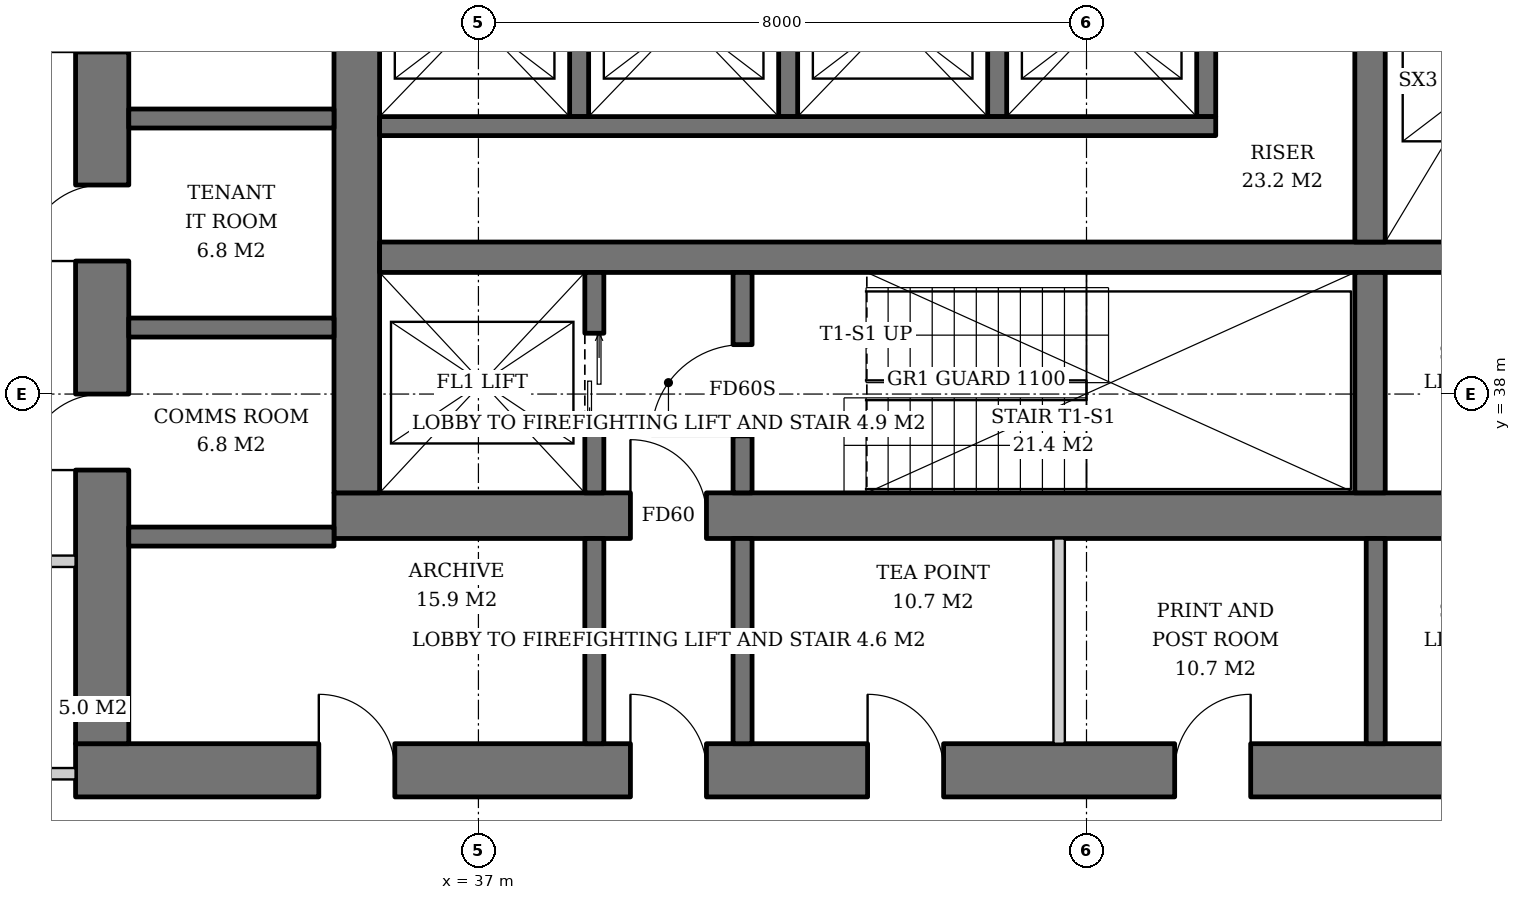
"""IFC4 building model, lengths in metres.
Left out: names, types, materials, properties, quantities, classifications, styles, units other than length and angle.
Written with IfcOpenShell. Run it as: python <this file> out.ifc"""

import sys

from ifc_helpers import new_model, si_unit, direction, frame, frame_2d, origin, place, context, subcontext, project, spatial, rectangle, extrude, element, fill, save


model = new_model("IFC4")
c1 = context("Model", 3, precision=1e-05, world=origin(), true_north=direction((0.0, 1.0)))
c2 = subcontext(c1, "Body", "Model", "MODEL_VIEW")
j1 = project(units=[si_unit("LENGTHUNIT", "METRE"), si_unit("PLANEANGLEUNIT", "RADIAN")], contexts=[c1])
p1 = place(None, origin())
s1 = spatial("IfcSite", under=j1, at=p1, CompositionType="ELEMENT")
p2 = place(p1, origin())
s2 = spatial("IfcBuilding", under=s1, at=p2, CompositionType="ELEMENT")
p3 = place(p2, frame((0.0, 0.0, 146.4)))
s3 = spatial("IfcBuildingStorey", under=s2, at=p3, CompositionType="ELEMENT", Elevation=146.4)
p4 = place(p3, frame((35.1, 36.4, 0.0), z_axis=(0.0, 0.0, 1.0), x_axis=(1.0, 0.0, 0.0)))
e1 = element("IfcWall", 1, at=p4, inside=s3, PredefinedType="SHEAR", context=c2, shape_type="SweptSolid", body=[
    extrude(rectangle(XDim=19.8, YDim=0.6, at=frame_2d((9.9, 0.0))), origin(), (0.0, 0.0, 1.0), 3.8),
])
p5 = place(p4, frame((3.9, 0.0, 0.0)))
e2 = element("IfcOpeningElement", 2, at=p5, cuts=e1, PredefinedType="OPENING", context=c2, shape_type="SweptSolid", body=[
    extrude(rectangle(XDim=1.0, YDim=2.1, at=frame_2d((0.5, 1.05))), frame((0.0, 0.31, 0.0), z_axis=(0.0, -1.0, 0.0), x_axis=(1.0, 0.0, 0.0)), (0.0, 0.0, 1.0), 0.62),
])
p6 = place(p4, frame((15.35, 0.0, 0.0)))
e3 = element("IfcOpeningElement", 3, at=p6, cuts=e1, PredefinedType="OPENING", context=c2, shape_type="SweptSolid", body=[
    extrude(rectangle(XDim=1.0, YDim=2.1, at=frame_2d((0.5, 1.05))), frame((0.0, 0.31, 0.0), z_axis=(0.0, -1.0, 0.0), x_axis=(1.0, 0.0, 0.0)), (0.0, 0.0, 1.0), 0.62),
])
p7 = place(p3, frame((35.4, 36.7, 0.0), z_axis=(0.0, 0.0, 1.0), x_axis=(0.0, 1.0, 0.0)))
e4 = element("IfcWall", 4, at=p7, inside=s3, PredefinedType="SHEAR", context=c2, shape_type="SweptSolid", body=[
    extrude(rectangle(XDim=18.6, YDim=0.6, at=frame_2d((9.3, 0.0))), origin(), (0.0, 0.0, 1.0), 3.8),
])
p8 = place(p7, frame((8.4, 0.0, 0.0)))
e5 = element("IfcOpeningElement", 5, at=p8, cuts=e4, PredefinedType="OPENING", context=c2, shape_type="SweptSolid", body=[
    extrude(rectangle(XDim=1.8, YDim=2.4, at=frame_2d((0.9, 1.2))), frame((0.0, 0.31, 0.0), z_axis=(0.0, -1.0, 0.0), x_axis=(1.0, 0.0, 0.0)), (0.0, 0.0, 1.0), 0.62),
])
p9 = place(p3, frame((31.7, 33.05, 0.0), z_axis=(0.0, 0.0, 1.0), x_axis=(1.0, 0.0, 0.0)))
e6 = element("IfcWall", 6, at=p9, inside=s3, PredefinedType="SHEAR", context=c2, shape_type="SweptSolid", body=[
    extrude(rectangle(XDim=26.6, YDim=0.7, at=frame_2d((13.3, 0.0))), origin(), (0.0, 0.0, 1.0), 3.8),
])
p10 = place(p9, frame((7.3, 0.0, 0.0)))
e7 = element("IfcOpeningElement", 7, at=p10, cuts=e6, PredefinedType="OPENING", context=c2, shape_type="SweptSolid", body=[
    extrude(rectangle(XDim=1.0, YDim=2.1, at=frame_2d((0.5, 1.05))), frame((0.0, 0.36, 0.0), z_axis=(0.0, -1.0, 0.0), x_axis=(1.0, 0.0, 0.0)), (0.0, 0.0, 1.0), 0.72),
])
p11 = place(p9, frame((18.75, 0.0, 0.0)))
e8 = element("IfcOpeningElement", 8, at=p11, cuts=e6, PredefinedType="OPENING", context=c2, shape_type="SweptSolid", body=[
    extrude(rectangle(XDim=1.0, YDim=2.1, at=frame_2d((0.5, 1.05))), frame((0.0, 0.36, 0.0), z_axis=(0.0, -1.0, 0.0), x_axis=(1.0, 0.0, 0.0)), (0.0, 0.0, 1.0), 0.72),
])
p12 = place(p9, frame((3.2, 0.0, 0.0)))
e9 = element("IfcOpeningElement", 9, at=p12, cuts=e6, PredefinedType="OPENING", context=c2, shape_type="SweptSolid", body=[
    extrude(rectangle(XDim=1.0, YDim=2.1, at=frame_2d((0.5, 1.05))), frame((0.0, 0.36, 0.0), z_axis=(0.0, -1.0, 0.0), x_axis=(1.0, 0.0, 0.0)), (0.0, 0.0, 1.0), 0.72),
])
p13 = place(p9, frame((10.42, 0.0, 0.0)))
e10 = element("IfcOpeningElement", 10, at=p13, cuts=e6, PredefinedType="OPENING", context=c2, shape_type="SweptSolid", body=[
    extrude(rectangle(XDim=1.0, YDim=2.1, at=frame_2d((0.5, 1.05))), frame((0.0, 0.36, 0.0), z_axis=(0.0, -1.0, 0.0), x_axis=(1.0, 0.0, 0.0)), (0.0, 0.0, 1.0), 0.72),
])
p14 = place(p9, frame((14.46, 0.0, 0.0)))
e11 = element("IfcOpeningElement", 11, at=p14, cuts=e6, PredefinedType="OPENING", context=c2, shape_type="SweptSolid", body=[
    extrude(rectangle(XDim=1.0, YDim=2.1, at=frame_2d((0.5, 1.05))), frame((0.0, 0.36, 0.0), z_axis=(0.0, -1.0, 0.0), x_axis=(1.0, 0.0, 0.0)), (0.0, 0.0, 1.0), 0.72),
])
p15 = place(p9, frame((22.5, 0.0, 0.0)))
e12 = element("IfcOpeningElement", 12, at=p15, cuts=e6, PredefinedType="OPENING", context=c2, shape_type="SweptSolid", body=[
    extrude(rectangle(XDim=1.0, YDim=2.1, at=frame_2d((0.5, 1.05))), frame((0.0, 0.36, 0.0), z_axis=(0.0, -1.0, 0.0), x_axis=(1.0, 0.0, 0.0)), (0.0, 0.0, 1.0), 0.72),
])
p16 = place(p3, frame((32.05, 33.4, 0.0), z_axis=(0.0, 0.0, 1.0), x_axis=(0.0, 1.0, 0.0)))
e13 = element("IfcWall", 13, at=p16, inside=s3, PredefinedType="SHEAR", context=c2, shape_type="SweptSolid", body=[
    extrude(rectangle(XDim=25.2, YDim=0.7, at=frame_2d((12.6, 0.0))), origin(), (0.0, 0.0, 1.0), 3.8),
])
p17 = place(p16, frame((11.7, 0.0, 0.0)))
e14 = element("IfcOpeningElement", 14, at=p17, cuts=e13, PredefinedType="OPENING", context=c2, shape_type="SweptSolid", body=[
    extrude(rectangle(XDim=1.8, YDim=2.4, at=frame_2d((0.9, 1.2))), frame((0.0, 0.36, 0.0), z_axis=(0.0, -1.0, 0.0), x_axis=(1.0, 0.0, 0.0)), (0.0, 0.0, 1.0), 0.72),
])
p18 = place(p16, frame((3.6, 0.0, 0.0)))
e15 = element("IfcOpeningElement", 15, at=p18, cuts=e13, PredefinedType="OPENING", context=c2, shape_type="SweptSolid", body=[
    extrude(rectangle(XDim=1.0, YDim=2.1, at=frame_2d((0.5, 1.05))), frame((0.0, 0.36, 0.0), z_axis=(0.0, -1.0, 0.0), x_axis=(1.0, 0.0, 0.0)), (0.0, 0.0, 1.0), 0.72),
])
p19 = place(p16, frame((6.35, 0.0, 0.0)))
e16 = element("IfcOpeningElement", 16, at=p19, cuts=e13, PredefinedType="OPENING", context=c2, shape_type="SweptSolid", body=[
    extrude(rectangle(XDim=1.0, YDim=2.1, at=frame_2d((0.5, 1.05))), frame((0.0, 0.36, 0.0), z_axis=(0.0, -1.0, 0.0), x_axis=(1.0, 0.0, 0.0)), (0.0, 0.0, 1.0), 0.72),
])
p20 = place(p16, frame((9.1, 0.0, 0.0)))
e17 = element("IfcOpeningElement", 17, at=p20, cuts=e13, PredefinedType="OPENING", context=c2, shape_type="SweptSolid", body=[
    extrude(rectangle(XDim=1.0, YDim=2.1, at=frame_2d((0.5, 1.05))), frame((0.0, 0.36, 0.0), z_axis=(0.0, -1.0, 0.0), x_axis=(1.0, 0.0, 0.0)), (0.0, 0.0, 1.0), 0.72),
])
p21 = place(p16, frame((15.1, 0.0, 0.0)))
e18 = element("IfcOpeningElement", 18, at=p21, cuts=e13, PredefinedType="OPENING", context=c2, shape_type="SweptSolid", body=[
    extrude(rectangle(XDim=1.0, YDim=2.1, at=frame_2d((0.5, 1.05))), frame((0.0, 0.36, 0.0), z_axis=(0.0, -1.0, 0.0), x_axis=(1.0, 0.0, 0.0)), (0.0, 0.0, 1.0), 0.72),
])
p22 = place(p16, frame((17.85, 0.0, 0.0)))
e19 = element("IfcOpeningElement", 19, at=p22, cuts=e13, PredefinedType="OPENING", context=c2, shape_type="SweptSolid", body=[
    extrude(rectangle(XDim=1.0, YDim=2.1, at=frame_2d((0.5, 1.05))), frame((0.0, 0.36, 0.0), z_axis=(0.0, -1.0, 0.0), x_axis=(1.0, 0.0, 0.0)), (0.0, 0.0, 1.0), 0.72),
])
p23 = place(p3, frame((35.7, 39.8, 0.0), z_axis=(0.0, 0.0, 1.0), x_axis=(1.0, 0.0, 0.0)))
e20 = element("IfcWall", 20, at=p23, inside=s3, PredefinedType="SHEAR", context=c2, shape_type="SweptSolid", body=[
    extrude(rectangle(XDim=18.6, YDim=0.4, at=frame_2d((9.3, 0.0))), origin(), (0.0, 0.0, 1.0), 3.8),
])
p24 = place(p3, frame((48.73, 36.7, 0.0), z_axis=(0.0, 0.0, 1.0), x_axis=(0.0, 1.0, 0.0)))
e21 = element("IfcWall", 21, at=p24, inside=s3, PredefinedType="SHEAR", context=c2, shape_type="SweptSolid", body=[
    extrude(rectangle(XDim=2.9, YDim=0.4, at=frame_2d((1.45, 0.0))), origin(), (0.0, 0.0, 1.0), 3.8),
])
p25 = place(p3, frame((48.73, 40.0, 0.0), z_axis=(0.0, 0.0, 1.0), x_axis=(0.0, 1.0, 0.0)))
e22 = element("IfcWall", 22, at=p25, inside=s3, PredefinedType="SHEAR", context=c2, shape_type="SweptSolid", body=[
    extrude(rectangle(XDim=12.0, YDim=0.4, at=frame_2d((6.0, 0.0))), origin(), (0.0, 0.0, 1.0), 3.8),
])
p26 = place(p3, frame((38.525, 36.7, 0.0), z_axis=(0.0, 0.0, 1.0), x_axis=(0.0, 1.0, 0.0)))
e23 = element("IfcWall", 23, at=p26, inside=s3, PredefinedType="SHEAR", context=c2, shape_type="SweptSolid", body=[
    extrude(rectangle(XDim=2.9, YDim=0.25, at=frame_2d((1.45, 0.0))), origin(), (0.0, 0.0, 1.0), 3.8),
])
p27 = place(p26, frame((0.8, 0.0, 0.0)))
e24 = element("IfcOpeningElement", 24, at=p27, cuts=e23, PredefinedType="OPENING", context=c2, shape_type="SweptSolid", body=[
    extrude(rectangle(XDim=1.3, YDim=2.2, at=frame_2d((0.65, 1.1))), frame((0.0, 0.135, 0.0), z_axis=(0.0, -1.0, 0.0), x_axis=(1.0, 0.0, 0.0)), (0.0, 0.0, 1.0), 0.27),
])
p28 = place(p3, frame((40.475, 36.7, 0.0), z_axis=(0.0, 0.0, 1.0), x_axis=(0.0, 1.0, 0.0)))
e25 = element("IfcWall", 25, at=p28, inside=s3, PredefinedType="SHEAR", context=c2, shape_type="SweptSolid", body=[
    extrude(rectangle(XDim=2.9, YDim=0.25, at=frame_2d((1.45, 0.0))), origin(), (0.0, 0.0, 1.0), 3.8),
])
p29 = place(p28, frame((0.75, 0.0, 0.0)))
e26 = element("IfcOpeningElement", 26, at=p29, cuts=e25, PredefinedType="OPENING", context=c2, shape_type="SweptSolid", body=[
    extrude(rectangle(XDim=1.2, YDim=2.1, at=frame_2d((0.6, 1.05))), frame((0.0, 0.135, 0.0), z_axis=(0.0, -1.0, 0.0), x_axis=(1.0, 0.0, 0.0)), (0.0, 0.0, 1.0), 0.27),
])
for number, where, z_axis, x_axis in (
    (27, (38.325, 44.25, 0.0), (0.0, 0.0, 1.0), (0.0, -1.0, 0.0)),
    (28, (41.075, 44.25, 0.0), (0.0, 0.0, 1.0), (0.0, -1.0, 0.0)),
    (29, (43.825, 44.25, 0.0), (0.0, 0.0, 1.0), (0.0, -1.0, 0.0)),
    (30, (46.575, 44.25, 0.0), (0.0, 0.0, 1.0), (0.0, -1.0, 0.0)),
):
    element("IfcWall", number, at=place(p3, frame(where, z_axis=z_axis, x_axis=x_axis)), inside=s3, PredefinedType="SHEAR", context=c2, shape_type="SweptSolid", body=[
        extrude(rectangle(XDim=2.6, YDim=0.25, at=frame_2d((1.3, 0.0))), origin(), (0.0, 0.0, 1.0), 3.8),
    ])
p30 = place(p3, frame((35.7, 41.525, 0.0), z_axis=(0.0, 0.0, 1.0), x_axis=(1.0, 0.0, 0.0)))
e31 = element("IfcWall", 31, at=p30, inside=s3, PredefinedType="SHEAR", context=c2, shape_type="SweptSolid", body=[
    extrude(rectangle(XDim=11.0, YDim=0.25, at=frame_2d((5.5, 0.0))), origin(), (0.0, 0.0, 1.0), 3.8),
])
for number, where, z_axis, x_axis in (
    (32, (32.4, 36.125, 0.0), (0.0, 0.0, 1.0), (1.0, 0.0, 0.0)),
    (33, (32.4, 38.875, 0.0), (0.0, 0.0, 1.0), (1.0, 0.0, 0.0)),
    (34, (32.4, 41.625, 0.0), (0.0, 0.0, 1.0), (1.0, 0.0, 0.0)),
):
    element("IfcWall", number, at=place(p3, frame(where, z_axis=z_axis, x_axis=x_axis)), inside=s3, PredefinedType="SHEAR", context=c2, shape_type="SweptSolid", body=[
        extrude(rectangle(XDim=2.7, YDim=0.25, at=frame_2d((1.35, 0.0))), origin(), (0.0, 0.0, 1.0), 3.8),
    ])
for number, where, z_axis, x_axis in (
    (35, (38.525, 33.4, 0.0), (0.0, 0.0, 1.0), (0.0, 1.0, 0.0)),
    (36, (40.475, 33.4, 0.0), (0.0, 0.0, 1.0), (0.0, 1.0, 0.0)),
    (37, (48.805, 33.4, 0.0), (0.0, 0.0, 1.0), (0.0, 1.0, 0.0)),
):
    element("IfcWall", number, at=place(p3, frame(where, z_axis=z_axis, x_axis=x_axis)), inside=s3, PredefinedType="SOLIDWALL", context=c2, shape_type="SweptSolid", body=[
        extrude(rectangle(XDim=2.7, YDim=0.25, at=frame_2d((1.35, 0.0))), origin(), (0.0, 0.0, 1.0), 3.62),
    ])
p31 = place(p3, frame((44.64, 33.4, 0.0), z_axis=(0.0, 0.0, 1.0), x_axis=(0.0, 1.0, 0.0)))
e38 = element("IfcWall", 38, at=p31, inside=s3, PredefinedType="SOLIDWALL", context=c2, shape_type="SweptSolid", body=[
    extrude(rectangle(XDim=2.7, YDim=0.15, at=frame_2d((1.35, 0.0))), origin(), (0.0, 0.0, 1.0), 3.62),
])
for number, where, z_axis, x_axis in (
    (39, (31.7, 35.8, 0.0), (0.0, 0.0, 1.0), (-1.0, 0.0, 0.0)),
    (40, (31.7, 33.005, 0.0), (0.0, 0.0, 1.0), (-1.0, 0.0, 0.0)),
):
    element("IfcWall", number, at=place(p3, frame(where, z_axis=z_axis, x_axis=x_axis)), inside=s3, PredefinedType="PARTITIONING", context=c2, shape_type="SweptSolid", body=[
        extrude(rectangle(XDim=1.725, YDim=0.15, at=frame_2d((0.862, 0.0))), origin(), (0.0, 0.0, 1.0), 3.62),
    ])
p32 = place(p27, origin())
e41 = element("IfcDoor", 41, at=p32, inside=s3, OperationType="DOUBLE_DOOR_SLIDING", PredefinedType="DOOR", context=c2, shape_type="SweptSolid", body=[
    extrude(rectangle(XDim=1.3, YDim=2.2, at=frame_2d((0.65, 1.1))), frame((0.0, 0.025, 0.0), z_axis=(0.0, -1.0, 0.0), x_axis=(1.0, 0.0, 0.0)), (0.0, 0.0, 1.0), 0.05),
])
fill(e24, e41)
p33 = place(p29, origin())
e42 = element("IfcDoor", 42, at=p33, inside=s3, OperationType="SINGLE_SWING_LEFT", PredefinedType="DOOR", context=c2, shape_type="SweptSolid", body=[
    extrude(rectangle(XDim=1.2, YDim=2.1, at=frame_2d((0.6, 1.05))), frame((0.0, 0.025, 0.0), z_axis=(0.0, -1.0, 0.0), x_axis=(1.0, 0.0, 0.0)), (0.0, 0.0, 1.0), 0.05),
])
fill(e26, e42)
p34 = place(p5, origin())
e43 = element("IfcDoor", 43, at=p34, inside=s3, OperationType="SINGLE_SWING_LEFT", PredefinedType="DOOR", context=c2, shape_type="SweptSolid", body=[
    extrude(rectangle(XDim=1.0, YDim=2.1, at=frame_2d((0.5, 1.05))), frame((0.0, 0.025, 0.0), z_axis=(0.0, -1.0, 0.0), x_axis=(1.0, 0.0, 0.0)), (0.0, 0.0, 1.0), 0.05),
])
fill(e2, e43)
p35 = place(p10, origin())
e44 = element("IfcDoor", 44, at=p35, inside=s3, OperationType="SINGLE_SWING_LEFT", PredefinedType="DOOR", context=c2, shape_type="SweptSolid", body=[
    extrude(rectangle(XDim=1.0, YDim=2.1, at=frame_2d((0.5, 1.05))), frame((0.0, 0.025, 0.0), z_axis=(0.0, -1.0, 0.0), x_axis=(1.0, 0.0, 0.0)), (0.0, 0.0, 1.0), 0.05),
])
fill(e7, e44)
p36 = place(p18, origin())
e45 = element("IfcDoor", 45, at=p36, inside=s3, OperationType="SINGLE_SWING_LEFT", PredefinedType="DOOR", context=c2, shape_type="SweptSolid", body=[
    extrude(rectangle(XDim=1.0, YDim=2.1, at=frame_2d((0.5, 1.05))), frame((0.0, -0.29, 0.0), z_axis=(0.0, -1.0, 0.0), x_axis=(1.0, 0.0, 0.0)), (0.0, 0.0, 1.0), 0.05),
])
fill(e15, e45)
p37 = place(p19, origin())
e46 = element("IfcDoor", 46, at=p37, inside=s3, OperationType="SINGLE_SWING_LEFT", PredefinedType="DOOR", context=c2, shape_type="SweptSolid", body=[
    extrude(rectangle(XDim=1.0, YDim=2.1, at=frame_2d((0.5, 1.05))), frame((0.0, -0.29, 0.0), z_axis=(0.0, -1.0, 0.0), x_axis=(1.0, 0.0, 0.0)), (0.0, 0.0, 1.0), 0.05),
])
fill(e16, e46)
p38 = place(p12, origin())
e47 = element("IfcDoor", 47, at=p38, inside=s3, OperationType="SINGLE_SWING_LEFT", PredefinedType="DOOR", context=c2, shape_type="SweptSolid", body=[
    extrude(rectangle(XDim=1.0, YDim=2.1, at=frame_2d((0.5, 1.05))), frame((0.0, 0.34, 0.0), z_axis=(0.0, -1.0, 0.0), x_axis=(1.0, 0.0, 0.0)), (0.0, 0.0, 1.0), 0.05),
])
fill(e9, e47)
p39 = place(p13, origin())
e48 = element("IfcDoor", 48, at=p39, inside=s3, OperationType="SINGLE_SWING_LEFT", PredefinedType="DOOR", context=c2, shape_type="SweptSolid", body=[
    extrude(rectangle(XDim=1.0, YDim=2.1, at=frame_2d((0.5, 1.05))), frame((0.0, 0.34, 0.0), z_axis=(0.0, -1.0, 0.0), x_axis=(1.0, 0.0, 0.0)), (0.0, 0.0, 1.0), 0.05),
])
fill(e10, e48)
p40 = place(p14, origin())
e49 = element("IfcDoor", 49, at=p40, inside=s3, OperationType="SINGLE_SWING_RIGHT", PredefinedType="DOOR", context=c2, shape_type="SweptSolid", body=[
    extrude(rectangle(XDim=1.0, YDim=2.1, at=frame_2d((0.5, 1.05))), frame((0.0, 0.34, 0.0), z_axis=(0.0, -1.0, 0.0), x_axis=(1.0, 0.0, 0.0)), (0.0, 0.0, 1.0), 0.05),
])
fill(e11, e49)
save(model, sys.argv[1])
